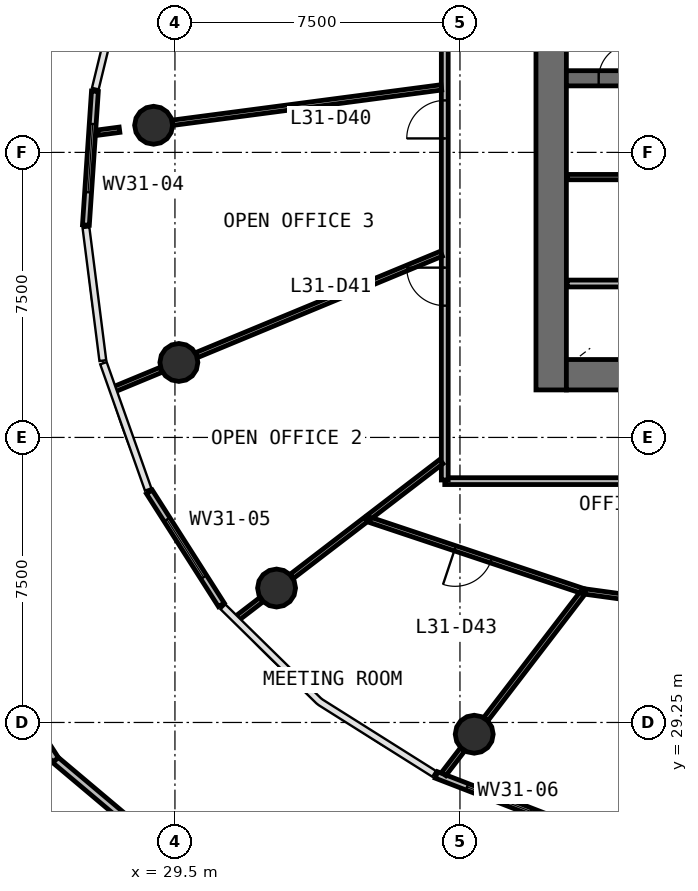
"""IFC4 building model, lengths in metres.
Left out: names, types, materials, properties, quantities, classifications, styles, units other than length and angle.
Written with IfcOpenShell. Run it as: python <this file> out.ifc"""

import sys

from ifc_helpers import new_model, si_unit, direction, frame, frame_2d, origin, origin_2d, place, context, subcontext, project, spatial, rectangle, circle, extrude, source, transform, mapped, element, fill, save


model = new_model("IFC4")
c1 = context("Model", 3, precision=1e-05, world=origin(), true_north=direction((0.0, 1.0)))
c2 = subcontext(c1, "Body", "Model", "MODEL_VIEW")
j1 = project(units=[si_unit("LENGTHUNIT", "METRE"), si_unit("PLANEANGLEUNIT", "RADIAN")], contexts=[c1])
p1 = place(None, origin())
s1 = spatial("IfcSite", under=j1, at=p1, CompositionType="ELEMENT")
p2 = place(p1, origin())
s2 = spatial("IfcBuilding", under=s1, at=p2, CompositionType="ELEMENT")
p3 = place(p2, frame((0.0, 0.0, 133.1)))
s3 = spatial("IfcBuildingStorey", under=s2, at=p3, CompositionType="ELEMENT", Elevation=133.1)
p4 = place(p3, frame((39.4, 58.0, 0.0), z_axis=(0.0, 0.0, 1.0), x_axis=(0.0, -1.0, 0.0)))
e1 = element("IfcWall", 1, at=p4, inside=s3, PredefinedType="SHEAR", context=c2, shape_type="SweptSolid", body=[
    extrude(rectangle(XDim=20.0, YDim=0.8, at=frame_2d((10.0, 0.0))), origin(), (0.0, 0.0, 1.0), 3.9),
])
p5 = place(p4, frame((9.1, 0.0, 0.0)))
e2 = element("IfcOpeningElement", 2, at=p5, cuts=e1, PredefinedType="OPENING", context=c2, shape_type="SweptSolid", body=[
    extrude(rectangle(XDim=1.8, YDim=2.1, at=frame_2d((0.9, 1.05))), frame((0.0, 0.41, 0.0), z_axis=(0.0, -1.0, 0.0), x_axis=(1.0, 0.0, 0.0)), (0.0, 0.0, 1.0), 0.82),
])
p6 = place(p3, frame((39.8, 38.4, 0.0), z_axis=(0.0, 0.0, 1.0), x_axis=(1.0, 0.0, 0.0)))
e3 = element("IfcWall", 3, at=p6, inside=s3, PredefinedType="SHEAR", context=c2, shape_type="SweptSolid", body=[
    extrude(rectangle(XDim=24.4, YDim=0.8, at=frame_2d((12.2, 0.0))), origin(), (0.0, 0.0, 1.0), 3.9),
])
p7 = place(p6, frame((21.65, 0.0, 0.0)))
e4 = element("IfcOpeningElement", 4, at=p7, cuts=e3, PredefinedType="OPENING", context=c2, shape_type="SweptSolid", body=[
    extrude(rectangle(XDim=1.1, YDim=2.1, at=frame_2d((0.55, 1.05))), frame((0.0, 0.41, 0.0), z_axis=(0.0, -1.0, 0.0), x_axis=(1.0, 0.0, 0.0)), (0.0, 0.0, 1.0), 0.82),
])
p8 = place(p6, frame((2.15, 0.0, 0.0)))
e5 = element("IfcOpeningElement", 5, at=p8, cuts=e3, PredefinedType="OPENING", context=c2, shape_type="SweptSolid", body=[
    extrude(rectangle(XDim=1.1, YDim=2.1, at=frame_2d((0.55, 1.05))), frame((0.0, 0.41, 0.0), z_axis=(0.0, -1.0, 0.0), x_axis=(1.0, 0.0, 0.0)), (0.0, 0.0, 1.0), 0.82),
])
p9 = place(p3, frame((39.8, 46.2, 0.0), z_axis=(0.0, 0.0, 1.0), x_axis=(1.0, 0.0, 0.0)))
e6 = element("IfcWall", 6, at=p9, inside=s3, PredefinedType="SHEAR", context=c2, shape_type="SweptSolid", body=[
    extrude(rectangle(XDim=24.4, YDim=0.4, at=frame_2d((12.2, 0.0))), origin(), (0.0, 0.0, 1.0), 3.9),
])
p10 = place(p9, frame((13.6, 0.0, 0.0)))
e7 = element("IfcOpeningElement", 7, at=p10, cuts=e6, PredefinedType="OPENING", context=c2, shape_type="SweptSolid", body=[
    extrude(rectangle(XDim=1.1, YDim=2.1, at=frame_2d((0.55, 1.05))), frame((0.0, 0.21, 0.0), z_axis=(0.0, -1.0, 0.0), x_axis=(1.0, 0.0, 0.0)), (0.0, 0.0, 1.0), 0.42),
])
p11 = place(p9, frame((16.1, 0.0, 0.0)))
e8 = element("IfcOpeningElement", 8, at=p11, cuts=e6, PredefinedType="OPENING", context=c2, shape_type="SweptSolid", body=[
    extrude(rectangle(XDim=1.1, YDim=2.1, at=frame_2d((0.55, 1.05))), frame((0.0, 0.21, 0.0), z_axis=(0.0, -1.0, 0.0), x_axis=(1.0, 0.0, 0.0)), (0.0, 0.0, 1.0), 0.42),
])
p12 = place(p9, frame((18.6, 0.0, 0.0)))
e9 = element("IfcOpeningElement", 9, at=p12, cuts=e6, PredefinedType="OPENING", context=c2, shape_type="SweptSolid", body=[
    extrude(rectangle(XDim=1.1, YDim=2.1, at=frame_2d((0.55, 1.05))), frame((0.0, 0.21, 0.0), z_axis=(0.0, -1.0, 0.0), x_axis=(1.0, 0.0, 0.0)), (0.0, 0.0, 1.0), 0.42),
])
p13 = place(p9, frame((4.7, 0.0, 0.0)))
e10 = element("IfcOpeningElement", 10, at=p13, cuts=e6, PredefinedType="OPENING", context=c2, shape_type="SweptSolid", body=[
    extrude(rectangle(XDim=1.1, YDim=2.1, at=frame_2d((0.55, 1.05))), frame((0.0, 0.21, 0.0), z_axis=(0.0, -1.0, 0.0), x_axis=(1.0, 0.0, 0.0)), (0.0, 0.0, 1.0), 0.42),
])
p14 = place(p9, frame((7.2, 0.0, 0.0)))
e11 = element("IfcOpeningElement", 11, at=p14, cuts=e6, PredefinedType="OPENING", context=c2, shape_type="SweptSolid", body=[
    extrude(rectangle(XDim=1.1, YDim=2.1, at=frame_2d((0.55, 1.05))), frame((0.0, 0.21, 0.0), z_axis=(0.0, -1.0, 0.0), x_axis=(1.0, 0.0, 0.0)), (0.0, 0.0, 1.0), 0.42),
])
p15 = place(p9, frame((9.7, 0.0, 0.0)))
e12 = element("IfcOpeningElement", 12, at=p15, cuts=e6, PredefinedType="OPENING", context=c2, shape_type="SweptSolid", body=[
    extrude(rectangle(XDim=1.1, YDim=2.1, at=frame_2d((0.55, 1.05))), frame((0.0, 0.21, 0.0), z_axis=(0.0, -1.0, 0.0), x_axis=(1.0, 0.0, 0.0)), (0.0, 0.0, 1.0), 0.42),
])
p16 = place(p9, frame((20.65, 0.0, 0.0)))
e13 = element("IfcOpeningElement", 13, at=p16, cuts=e6, PredefinedType="OPENING", context=c2, shape_type="SweptSolid", body=[
    extrude(rectangle(XDim=0.9, YDim=2.1, at=frame_2d((0.45, 1.05))), frame((0.0, 0.21, 0.0), z_axis=(0.0, -1.0, 0.0), x_axis=(1.0, 0.0, 0.0)), (0.0, 0.0, 1.0), 0.42),
])
p17 = place(p9, frame((22.65, 0.0, 0.0)))
e14 = element("IfcOpeningElement", 14, at=p17, cuts=e6, PredefinedType="OPENING", context=c2, shape_type="SweptSolid", body=[
    extrude(rectangle(XDim=0.9, YDim=2.1, at=frame_2d((0.45, 1.05))), frame((0.0, 0.21, 0.0), z_axis=(0.0, -1.0, 0.0), x_axis=(1.0, 0.0, 0.0)), (0.0, 0.0, 1.0), 0.42),
])
p18 = place(p9, frame((0.85, 0.0, 0.0)))
e15 = element("IfcOpeningElement", 15, at=p18, cuts=e6, PredefinedType="OPENING", context=c2, shape_type="SweptSolid", body=[
    extrude(rectangle(XDim=0.9, YDim=2.1, at=frame_2d((0.45, 1.05))), frame((0.0, 0.21, 0.0), z_axis=(0.0, -1.0, 0.0), x_axis=(1.0, 0.0, 0.0)), (0.0, 0.0, 1.0), 0.42),
])
p19 = place(p9, frame((2.85, 0.0, 0.0)))
e16 = element("IfcOpeningElement", 16, at=p19, cuts=e6, PredefinedType="OPENING", context=c2, shape_type="SweptSolid", body=[
    extrude(rectangle(XDim=0.9, YDim=2.1, at=frame_2d((0.45, 1.05))), frame((0.0, 0.21, 0.0), z_axis=(0.0, -1.0, 0.0), x_axis=(1.0, 0.0, 0.0)), (0.0, 0.0, 1.0), 0.42),
])
p20 = place(p9, frame((11.85, 0.0, 0.0)))
e17 = element("IfcOpeningElement", 17, at=p20, cuts=e6, PredefinedType="OPENING", context=c2, shape_type="SweptSolid", body=[
    extrude(rectangle(XDim=0.9, YDim=2.1, at=frame_2d((0.45, 1.05))), frame((0.0, 0.21, 0.0), z_axis=(0.0, -1.0, 0.0), x_axis=(1.0, 0.0, 0.0)), (0.0, 0.0, 1.0), 0.42),
])
m1 = source(origin(), c2, "Body", "SweptSolid", [
    extrude(circle(Radius=0.5, at=origin_2d()), origin(), (0.0, 0.0, 1.0), 4.22),
])
for number, where, z_axis, x_axis in (
    (18, (28.938, 44.964, -0.32), (0.0, 0.0, 1.0), (1.0, 0.0, 0.0)),
    (19, (29.603, 38.723, -0.32), (0.0, 0.0, 1.0), (1.0, 0.0, 0.0)),
    (20, (32.174, 32.787, -0.32), (0.0, 0.0, 1.0), (1.0, 0.0, 0.0)),
    (21, (37.375, 28.94, -0.32), (0.0, 0.0, 1.0), (1.0, 0.0, 0.0)),
):
    element("IfcColumn", number, at=place(p3, frame(where, z_axis=z_axis, x_axis=x_axis)), inside=s3, PredefinedType="COLUMN", context=c2, shape_type="MappedRepresentation", body=[
        mapped(m1, transform((0.0, 0.0, 0.0), scale=1.0)),
    ])
p21 = place(p3, frame((27.394, 45.859, 0.0), z_axis=(0.0, 0.0, 1.0), x_axis=(-0.067272341836, -0.997734650107, 0.0)))
e22 = element("IfcWall", 22, at=p21, inside=s3, PredefinedType="STANDARD", context=c2, shape_type="SweptSolid", body=[
    extrude(rectangle(XDim=3.528, YDim=0.18, at=frame_2d((1.764, 0.0))), origin(), (0.0, 0.0, 1.0), 3.58),
])
p22 = place(p21, frame((0.864, 0.0, 0.9)))
e23 = element("IfcOpeningElement", 23, at=p22, cuts=e22, PredefinedType="OPENING", context=c2, shape_type="SweptSolid", body=[
    extrude(rectangle(XDim=1.8, YDim=2.1, at=frame_2d((0.9, 1.05))), frame((0.0, 0.1, 0.0), z_axis=(0.0, -1.0, 0.0), x_axis=(1.0, 0.0, 0.0)), (0.0, 0.0, 1.0), 0.2),
])
p23 = place(p3, frame((28.826, 35.318, 0.0), z_axis=(0.0, 0.0, 1.0), x_axis=(0.537561032447, -0.843224843321, 0.0)))
e24 = element("IfcWall", 24, at=p23, inside=s3, PredefinedType="STANDARD", context=c2, shape_type="SweptSolid", body=[
    extrude(rectangle(XDim=3.525, YDim=0.18, at=frame_2d((1.762, 0.0))), origin(), (0.0, 0.0, 1.0), 3.58),
])
p24 = place(p23, frame((0.862, 0.0, 0.9)))
e25 = element("IfcOpeningElement", 25, at=p24, cuts=e24, PredefinedType="OPENING", context=c2, shape_type="SweptSolid", body=[
    extrude(rectangle(XDim=1.8, YDim=2.1, at=frame_2d((0.9, 1.05))), frame((0.0, 0.1, 0.0), z_axis=(0.0, -1.0, 0.0), x_axis=(1.0, 0.0, 0.0)), (0.0, 0.0, 1.0), 0.2),
])
p25 = place(p3, frame((36.381, 27.869, 0.0), z_axis=(0.0, 0.0, 1.0), x_axis=(0.932854177958, -0.36025419174, 0.0)))
e26 = element("IfcWall", 26, at=p25, inside=s3, PredefinedType="STANDARD", context=c2, shape_type="SweptSolid", body=[
    extrude(rectangle(XDim=3.527, YDim=0.18, at=frame_2d((1.764, 0.0))), origin(), (0.0, 0.0, 1.0), 3.328),
])
p26 = place(p25, frame((0.864, 0.0, 0.9)))
e27 = element("IfcOpeningElement", 27, at=p26, cuts=e26, PredefinedType="OPENING", context=c2, shape_type="SweptSolid", body=[
    extrude(rectangle(XDim=1.8, YDim=2.1, at=frame_2d((0.9, 1.05))), frame((0.0, 0.1, 0.0), z_axis=(0.0, -1.0, 0.0), x_axis=(1.0, 0.0, 0.0)), (0.0, 0.0, 1.0), 0.2),
])
p27 = place(p3, frame((30.825, 24.501, 0.0), z_axis=(0.0, 0.0, 1.0), x_axis=(-0.765075819532, 0.643940207136, 0.0)))
e28 = element("IfcWall", 28, at=p27, inside=s3, PredefinedType="PARAPET", context=c2, shape_type="SweptSolid", body=[
    extrude(rectangle(XDim=5.845, YDim=0.2, at=frame_2d((2.922, 0.0))), origin(), (0.0, 0.0, 1.0), 1.1),
])
p28 = place(p3, frame((26.353, 28.265, 0.0), z_axis=(0.0, 0.0, 1.0), x_axis=(-0.54241238692, 0.840112374933, 0.0)))
e29 = element("IfcWall", 29, at=p28, inside=s3, PredefinedType="PARAPET", context=c2, shape_type="SweptSolid", body=[
    extrude(rectangle(XDim=5.842, YDim=0.2, at=frame_2d((2.921, 0.0))), origin(), (0.0, 0.0, 1.0), 1.1),
])
p29 = place(p3, frame((67.4, 35.6, 0.0), z_axis=(0.0, 0.0, 1.0), x_axis=(-1.0, 0.0, 0.0)))
e30 = element("IfcWall", 30, at=p29, inside=s3, PredefinedType="PARTITIONING", context=c2, shape_type="SweptSolid", body=[
    extrude(rectangle(XDim=30.8, YDim=0.18, at=frame_2d((15.4, 0.0))), origin(), (0.0, 0.0, 1.0), 2.88),
])
p30 = place(p29, frame((14.95, 0.0, 0.0)))
e31 = element("IfcOpeningElement", 31, at=p30, cuts=e30, PredefinedType="OPENING", context=c2, shape_type="SweptSolid", body=[
    extrude(rectangle(XDim=1.0, YDim=2.1, at=frame_2d((0.5, 1.05))), frame((0.0, 0.1, 0.0), z_axis=(0.0, -1.0, 0.0), x_axis=(1.0, 0.0, 0.0)), (0.0, 0.0, 1.0), 0.2),
])
p31 = place(p29, frame((12.55, 0.0, 0.0)))
e32 = element("IfcOpeningElement", 32, at=p31, cuts=e30, PredefinedType="OPENING", context=c2, shape_type="SweptSolid", body=[
    extrude(rectangle(XDim=1.0, YDim=2.1, at=frame_2d((0.5, 1.05))), frame((0.0, 0.1, 0.0), z_axis=(0.0, -1.0, 0.0), x_axis=(1.0, 0.0, 0.0)), (0.0, 0.0, 1.0), 0.2),
])
p32 = place(p3, frame((36.6, 35.63, 0.0), z_axis=(0.0, 0.0, 1.0), x_axis=(0.0, 1.0, 0.0)))
e33 = element("IfcWall", 33, at=p32, inside=s3, PredefinedType="PARTITIONING", context=c2, shape_type="SweptSolid", body=[
    extrude(rectangle(XDim=23.638, YDim=0.18, at=frame_2d((11.819, 0.0))), origin(), (0.0, 0.0, 1.0), 2.88),
])
p33 = place(p32, frame((11.387, 0.0, 0.0)))
e34 = element("IfcOpeningElement", 34, at=p33, cuts=e33, PredefinedType="OPENING", context=c2, shape_type="SweptSolid", body=[
    extrude(rectangle(XDim=1.0, YDim=2.1, at=frame_2d((0.5, 1.05))), frame((0.0, 0.1, 0.0), z_axis=(0.0, -1.0, 0.0), x_axis=(1.0, 0.0, 0.0)), (0.0, 0.0, 1.0), 0.2),
])
p34 = place(p32, frame((8.988, 0.0, 0.0)))
e35 = element("IfcOpeningElement", 35, at=p34, cuts=e33, PredefinedType="OPENING", context=c2, shape_type="SweptSolid", body=[
    extrude(rectangle(XDim=1.0, YDim=2.1, at=frame_2d((0.5, 1.05))), frame((0.0, 0.1, 0.0), z_axis=(0.0, -1.0, 0.0), x_axis=(1.0, 0.0, 0.0)), (0.0, 0.0, 1.0), 0.2),
])
p35 = place(p32, frame((4.587, 0.0, 0.0)))
e36 = element("IfcOpeningElement", 36, at=p35, cuts=e33, PredefinedType="OPENING", context=c2, shape_type="SweptSolid", body=[
    extrude(rectangle(XDim=1.0, YDim=2.1, at=frame_2d((0.5, 1.05))), frame((0.0, 0.1, 0.0), z_axis=(0.0, -1.0, 0.0), x_axis=(1.0, 0.0, 0.0)), (0.0, 0.0, 1.0), 0.2),
])
p36 = place(p3, frame((39.82, 40.8, 0.0), z_axis=(0.0, 0.0, 1.0), x_axis=(1.0, 0.0, 0.0)))
e37 = element("IfcWall", 37, at=p36, inside=s3, PredefinedType="PARTITIONING", context=c2, shape_type="SweptSolid", body=[
    extrude(rectangle(XDim=3.95, YDim=0.18, at=frame_2d((1.975, 0.0))), origin(), (0.0, 0.0, 1.0), 3.58),
])
p37 = place(p36, frame((1.6, 0.0, 0.0)))
e38 = element("IfcOpeningElement", 38, at=p37, cuts=e37, PredefinedType="OPENING", context=c2, shape_type="SweptSolid", body=[
    extrude(rectangle(XDim=0.9, YDim=2.1, at=frame_2d((0.45, 1.05))), frame((0.0, 0.1, 0.0), z_axis=(0.0, -1.0, 0.0), x_axis=(1.0, 0.0, 0.0)), (0.0, 0.0, 1.0), 0.2),
])
p38 = place(p3, frame((36.51, 45.961, 0.0), z_axis=(0.0, 0.0, 1.0), x_axis=(-0.991447420849, -0.130506749601, 0.0)))
e39 = element("IfcWall", 39, at=p38, inside=s3, PredefinedType="PARTITIONING", context=c2, shape_type="SweptSolid", body=[
    extrude(rectangle(XDim=7.133, YDim=0.14, at=frame_2d((3.566, 0.0))), origin(), (0.0, 0.0, 1.0), 2.88),
])
p39 = place(p3, frame((36.51, 41.584, 0.0), z_axis=(0.0, 0.0, 1.0), x_axis=(-0.9238862136, -0.382667302392, 0.0)))
e40 = element("IfcWall", 40, at=p39, inside=s3, PredefinedType="PARTITIONING", context=c2, shape_type="SweptSolid", body=[
    extrude(rectangle(XDim=6.971, YDim=0.14, at=frame_2d((3.485, 0.0))), origin(), (0.0, 0.0, 1.0), 2.88),
])
p40 = place(p3, frame((40.26, 32.7, 0.0), z_axis=(0.0, 0.0, 1.0), x_axis=(-0.94841131313, 0.317042554126, 0.0)))
e41 = element("IfcWall", 41, at=p40, inside=s3, PredefinedType="PARTITIONING", context=c2, shape_type="SweptSolid", body=[
    extrude(rectangle(XDim=6.022, YDim=0.14, at=frame_2d((3.011, 0.0))), origin(), (0.0, 0.0, 1.0), 2.88),
])
p41 = place(p40, frame((2.572, 0.0, 0.0)))
e42 = element("IfcOpeningElement", 42, at=p41, cuts=e41, PredefinedType="OPENING", context=c2, shape_type="SweptSolid", body=[
    extrude(rectangle(XDim=1.0, YDim=2.1, at=frame_2d((0.5, 1.05))), frame((0.0, 0.08, 0.0), z_axis=(0.0, -1.0, 0.0), x_axis=(1.0, 0.0, 0.0)), (0.0, 0.0, 1.0), 0.16),
])
p42 = place(p3, frame((45.372, 32.0, 0.0), z_axis=(0.0, 0.0, 1.0), x_axis=(-0.990747746033, 0.135716261849, 0.0)))
e43 = element("IfcWall", 43, at=p42, inside=s3, PredefinedType="PARTITIONING", context=c2, shape_type="SweptSolid", body=[
    extrude(rectangle(XDim=5.13, YDim=0.14, at=frame_2d((2.565, 0.0))), origin(), (0.0, 0.0, 1.0), 2.88),
])
p43 = place(p42, frame((2.08, 0.0, 0.0)))
e44 = element("IfcOpeningElement", 44, at=p43, cuts=e43, PredefinedType="OPENING", context=c2, shape_type="SweptSolid", body=[
    extrude(rectangle(XDim=1.0, YDim=2.1, at=frame_2d((0.5, 1.05))), frame((0.0, 0.08, 0.0), z_axis=(0.0, -1.0, 0.0), x_axis=(1.0, 0.0, 0.0)), (0.0, 0.0, 1.0), 0.16),
])
p44 = place(p3, frame((40.215, 32.641, 0.0), z_axis=(0.0, 0.0, 1.0), x_axis=(-0.608771541946, -0.793345580259, 0.0)))
e45 = element("IfcWall", 45, at=p44, inside=s3, PredefinedType="PARTITIONING", context=c2, shape_type="SweptSolid", body=[
    extrude(rectangle(XDim=4.16, YDim=0.14, at=frame_2d((2.08, 0.0))), origin(), (0.0, 0.0, 1.0), 2.88),
])
p45 = place(p3, frame((36.51, 36.114, 0.0), z_axis=(0.0, 0.0, 1.0), x_axis=(-0.793375926436, -0.608731993041, 0.0)))
e46 = element("IfcWall", 46, at=p45, inside=s3, PredefinedType="PARTITIONING", context=c2, shape_type="SweptSolid", body=[
    extrude(rectangle(XDim=2.388, YDim=0.14, at=frame_2d((1.194, 0.0))), origin(), (0.0, 0.0, 1.0), 2.88),
])
p46 = place(p3, frame((34.525, 34.591, 0.0), z_axis=(0.0, 0.0, 1.0), x_axis=(-0.793361748198, -0.608750471455, 0.0)))
e47 = element("IfcWall", 47, at=p46, inside=s3, PredefinedType="PARTITIONING", context=c2, shape_type="SweptSolid", body=[
    extrude(rectangle(XDim=2.458, YDim=0.14, at=frame_2d((1.229, 0.0))), origin(), (0.0, 0.0, 1.0), 2.88),
])
p47 = place(p3, frame((41.77, 43.6, 0.0), z_axis=(0.0, 0.0, 1.0), x_axis=(-1.0, 0.0, 0.0)))
e48 = element("IfcWall", 48, at=p47, inside=s3, PredefinedType="PARTITIONING", context=c2, shape_type="SweptSolid", body=[
    extrude(rectangle(XDim=1.95, YDim=0.14, at=frame_2d((0.975, 0.0))), origin(), (0.0, 0.0, 1.0), 2.88),
])
p48 = place(p3, frame((29.137, 38.53, 0.0), z_axis=(0.0, 0.0, 1.0), x_axis=(-0.923905062812, -0.382621790952, 0.0)))
e49 = element("IfcWall", 49, at=p48, inside=s3, PredefinedType="PARTITIONING", context=c2, shape_type="SweptSolid", body=[
    extrude(rectangle(XDim=1.331, YDim=0.14, at=frame_2d((0.666, 0.0))), origin(), (0.0, 0.0, 1.0), 2.88),
])
p49 = place(p3, frame((28.041, 44.846, 0.0), z_axis=(0.0, 0.0, 1.0), x_axis=(-0.99145719693, -0.130432460129, 0.0)))
e50 = element("IfcWall", 50, at=p49, inside=s3, PredefinedType="PARTITIONING", context=c2, shape_type="SweptSolid", body=[
    extrude(rectangle(XDim=0.573, YDim=0.14, at=frame_2d((0.286, 0.0))), origin(), (0.0, 0.0, 1.0), 2.88),
])
p50 = place(p3, frame((37.068, 28.54, 0.0), z_axis=(0.0, 0.0, 1.0), x_axis=(-0.608796827704, -0.793326176663, 0.0)))
e51 = element("IfcWall", 51, at=p50, inside=s3, PredefinedType="PARTITIONING", context=c2, shape_type="SweptSolid", body=[
    extrude(rectangle(XDim=0.814, YDim=0.14, at=frame_2d((0.407, 0.0))), origin(), (0.0, 0.0, 1.0), 2.88),
])
p51 = place(p3, frame((31.774, 32.48, 0.0), z_axis=(0.0, 0.0, 1.0), x_axis=(-0.793361598143, -0.608750667015, 0.0)))
e52 = element("IfcWall", 52, at=p51, inside=s3, PredefinedType="PARTITIONING", context=c2, shape_type="SweptSolid", body=[
    extrude(rectangle(XDim=0.787, YDim=0.14, at=frame_2d((0.394, 0.0))), origin(), (0.0, 0.0, 1.0), 2.88),
])
m2 = source(origin(), c2, "Body", "SweptSolid", [
    extrude(rectangle(XDim=1.8, YDim=2.1, at=frame_2d((0.9, 1.05))), frame((0.0, 0.03, 0.0), z_axis=(0.0, -1.0, 0.0), x_axis=(1.0, 0.0, 0.0)), (0.0, 0.0, 1.0), 0.06),
])
p52 = place(p22, origin())
e53 = element("IfcWindow", 53, at=p52, inside=s3, PartitioningType="SINGLE_PANEL", PredefinedType="WINDOW", context=c2, shape_type="MappedRepresentation", body=[
    mapped(m2, transform((0.0, 0.0, 0.0), scale=1.0)),
])
fill(e23, e53)
p53 = place(p24, origin())
e54 = element("IfcWindow", 54, at=p53, inside=s3, PartitioningType="SINGLE_PANEL", PredefinedType="WINDOW", context=c2, shape_type="MappedRepresentation", body=[
    mapped(m2, transform((0.0, 0.0, 0.0), scale=1.0)),
])
fill(e25, e54)
p54 = place(p26, origin())
e55 = element("IfcWindow", 55, at=p54, inside=s3, PartitioningType="SINGLE_PANEL", PredefinedType="WINDOW", context=c2, shape_type="MappedRepresentation", body=[
    mapped(m2, transform((0.0, 0.0, 0.0), scale=1.0)),
])
fill(e27, e55)
m3 = source(origin(), c2, "Body", "SweptSolid", [
    extrude(rectangle(XDim=1.0, YDim=2.1, at=frame_2d((0.5, 1.05))), frame((0.0, 0.025, 0.0), z_axis=(0.0, -1.0, 0.0), x_axis=(1.0, 0.0, 0.0)), (0.0, 0.0, 1.0), 0.05),
])
p55 = place(p34, origin())
e56 = element("IfcDoor", 56, at=p55, inside=s3, OperationType="SINGLE_SWING_LEFT", PredefinedType="DOOR", context=c2, shape_type="MappedRepresentation", body=[
    mapped(m3, transform((0.0, 0.0, 0.0), scale=1.0)),
])
fill(e35, e56)
p56 = place(p35, origin())
e57 = element("IfcDoor", 57, at=p56, inside=s3, OperationType="SINGLE_SWING_RIGHT", PredefinedType="DOOR", context=c2, shape_type="MappedRepresentation", body=[
    mapped(m3, transform((0.0, 0.0, 0.0), scale=1.0)),
])
fill(e36, e57)
p57 = place(p41, origin())
e58 = element("IfcDoor", 58, at=p57, inside=s3, OperationType="SINGLE_SWING_RIGHT", PredefinedType="DOOR", context=c2, shape_type="MappedRepresentation", body=[
    mapped(m3, transform((0.0, 0.0, 0.0), scale=1.0)),
])
fill(e42, e58)
m4 = source(origin(), c2, "Body", "SweptSolid", [
    extrude(rectangle(XDim=0.9, YDim=2.1, at=frame_2d((0.45, 1.05))), frame((0.0, 0.025, 0.0), z_axis=(0.0, -1.0, 0.0), x_axis=(1.0, 0.0, 0.0)), (0.0, 0.0, 1.0), 0.05),
])
p58 = place(p18, origin())
e59 = element("IfcDoor", 59, at=p58, inside=s3, OperationType="SINGLE_SWING_RIGHT", PredefinedType="DOOR", context=c2, shape_type="MappedRepresentation", body=[
    mapped(m4, transform((0.0, 0.0, 0.0), scale=1.0)),
])
fill(e15, e59)
save(model, sys.argv[1])
